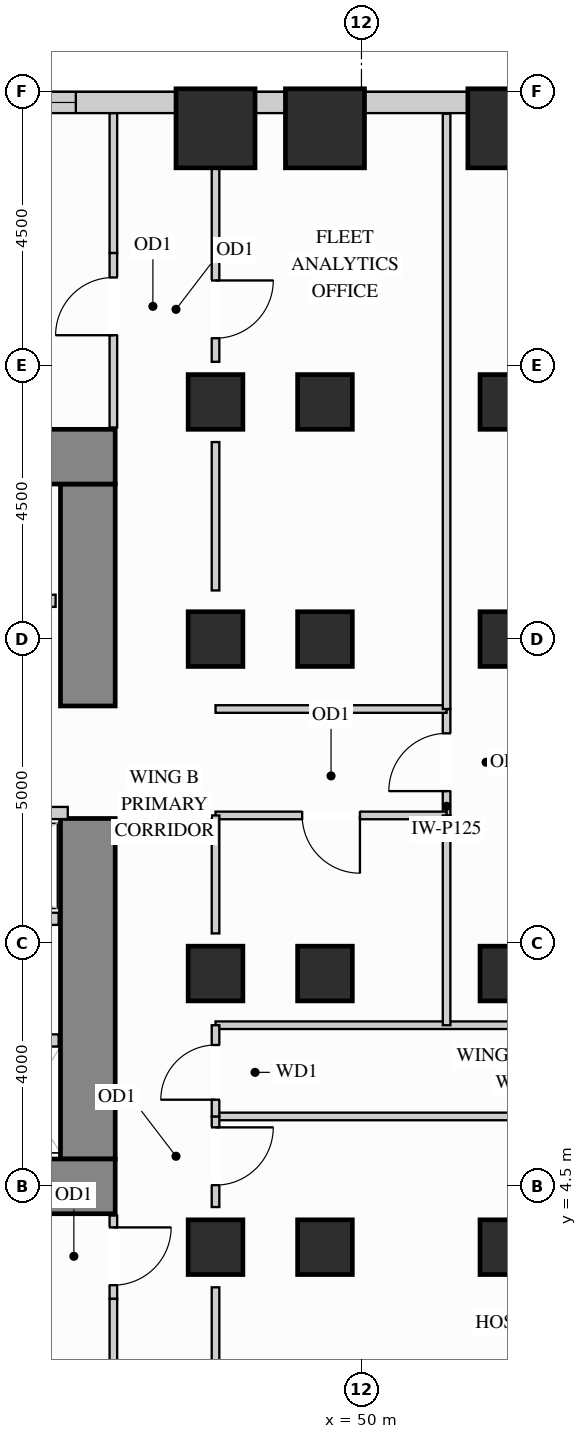
"""IFC4 building model, lengths in metres.
Left out: names, types, materials, properties, quantities, classifications, styles, units other than length and angle.
Written with IfcOpenShell. Run it as: python <this file> out.ifc"""

import sys

from ifc_helpers import new_model, si_unit, direction, frame, frame_2d, origin, origin_2d, place, context, subcontext, project, spatial, rectangle, extrude, source, transform, mapped, element, fill, save


model = new_model("IFC4")
c1 = context("Model", 3, precision=1e-05, world=origin(), true_north=direction((0.0, 1.0)))
c2 = subcontext(c1, "Body", "Model", "MODEL_VIEW")
j1 = project(units=[si_unit("LENGTHUNIT", "METRE"), si_unit("PLANEANGLEUNIT", "RADIAN")], contexts=[c1])
p1 = place(None, origin())
s1 = spatial("IfcSite", under=j1, at=p1, CompositionType="ELEMENT")
p2 = place(p1, origin())
s2 = spatial("IfcBuilding", under=s1, at=p2, CompositionType="ELEMENT")
p3 = place(p2, frame((0.0, 0.0, 62.1)))
s3 = spatial("IfcBuildingStorey", under=s2, at=p3, CompositionType="ELEMENT", Elevation=62.1)
m1 = source(origin(), c2, "Body", "SweptSolid", [
    extrude(rectangle(XDim=0.9, YDim=0.9, at=origin_2d()), origin(), (0.0, 0.0, 1.0), 3.38),
])
for number, where, z_axis, x_axis in (
    (1, (47.6, 13.5, 0.0), (0.0, 0.0, 1.0), (1.0, 0.0, 0.0)),
    (2, (47.6, 3.5, 0.0), (0.0, 0.0, 1.0), (1.0, 0.0, 0.0)),
    (3, (47.6, 8.0, 0.0), (0.0, 0.0, 1.0), (1.0, 0.0, 0.0)),
    (4, (47.6, 17.4, 0.0), (0.0, 0.0, 1.0), (1.0, 0.0, 0.0)),
    (5, (49.4, 13.5, 0.0), (0.0, 0.0, 1.0), (1.0, 0.0, 0.0)),
    (6, (49.4, 17.4, 0.0), (0.0, 0.0, 1.0), (1.0, 0.0, 0.0)),
    (7, (49.4, 3.5, 0.0), (0.0, 0.0, 1.0), (1.0, 0.0, 0.0)),
    (8, (49.4, 8.0, 0.0), (0.0, 0.0, 1.0), (1.0, 0.0, 0.0)),
    (9, (52.4, 13.5, 0.0), (0.0, 0.0, 1.0), (1.0, 0.0, 0.0)),
    (10, (52.4, 17.4, 0.0), (0.0, 0.0, 1.0), (1.0, 0.0, 0.0)),
    (11, (52.4, 3.5, 0.0), (0.0, 0.0, 1.0), (1.0, 0.0, 0.0)),
    (12, (52.4, 8.0, 0.0), (0.0, 0.0, 1.0), (1.0, 0.0, 0.0)),
):
    element("IfcColumn", number, at=place(p3, frame(where, z_axis=z_axis, x_axis=x_axis)), inside=s3, PredefinedType="COLUMN", context=c2, shape_type="MappedRepresentation", body=[
        mapped(m1, transform((0.0, 0.0, 0.0), x_axis=(1.0, 0.0, 0.0), y_axis=(0.0, 1.0, 0.0), z_axis=(0.0, 0.0, 1.0))),
    ])
m2 = source(origin(), c2, "Body", "SweptSolid", [
    extrude(rectangle(XDim=1.3, YDim=1.3, at=origin_2d()), origin(), (0.0, 0.0, 1.0), 3.38),
])
for number, where, z_axis, x_axis in (
    (13, (47.6, 21.9, 0.0), (0.0, 0.0, 1.0), (1.0, 0.0, 0.0)),
    (14, (49.4, 21.9, 0.0), (0.0, 0.0, 1.0), (1.0, 0.0, 0.0)),
    (15, (52.4, 21.9, 0.0), (0.0, 0.0, 1.0), (1.0, 0.0, 0.0)),
):
    element("IfcColumn", number, at=place(p3, frame(where, z_axis=z_axis, x_axis=x_axis)), inside=s3, PredefinedType="COLUMN", context=c2, shape_type="MappedRepresentation", body=[
        mapped(m2, transform((0.0, 0.0, 0.0), x_axis=(1.0, 0.0, 0.0), y_axis=(0.0, 1.0, 0.0), z_axis=(0.0, 0.0, 1.0))),
    ])
m3 = source(origin(), c2, "Body", "SweptSolid", [
    extrude(rectangle(XDim=5.6, YDim=0.9, at=frame_2d((2.8, 0.0))), origin(), (0.0, 0.0, 1.0), 3.38),
])
p4 = place(p3, frame((45.5, 4.95, 0.0), z_axis=(0.0, 0.0, 1.0), x_axis=(0.0, 1.0, 0.0)))
e16 = element("IfcWall", 16, at=p4, inside=s3, PredefinedType="SHEAR", context=c2, shape_type="MappedRepresentation", body=[
    mapped(m3, transform((0.0, 0.0, 0.0), x_axis=(1.0, 0.0, 0.0), y_axis=(0.0, 1.0, 0.0), z_axis=(0.0, 0.0, 1.0))),
])
m4 = source(origin(), c2, "Body", "SweptSolid", [
    extrude(rectangle(XDim=3.65, YDim=0.9, at=frame_2d((1.825, 0.0))), origin(), (0.0, 0.0, 1.0), 3.38),
])
p5 = place(p3, frame((45.5, 12.4, 0.0), z_axis=(0.0, 0.0, 1.0), x_axis=(0.0, 1.0, 0.0)))
e17 = element("IfcWall", 17, at=p5, inside=s3, PredefinedType="SHEAR", context=c2, shape_type="MappedRepresentation", body=[
    mapped(m4, transform((0.0, 0.0, 0.0), x_axis=(1.0, 0.0, 0.0), y_axis=(0.0, 1.0, 0.0), z_axis=(0.0, 0.0, 1.0))),
])
m5 = source(origin(), c2, "Body", "SweptSolid", [
    extrude(rectangle(XDim=10.4, YDim=0.9, at=frame_2d((5.2, 0.0))), origin(), (0.0, 0.0, 1.0), 3.38),
])
for number, where, z_axis, x_axis in (
    (18, (35.55, 16.5, 0.0), (0.0, 0.0, 1.0), (1.0, 0.0, 0.0)),
    (19, (35.55, 4.5, 0.0), (0.0, 0.0, 1.0), (1.0, 0.0, 0.0)),
):
    element("IfcWall", number, at=place(p3, frame(where, z_axis=z_axis, x_axis=x_axis)), inside=s3, PredefinedType="SHEAR", context=c2, shape_type="MappedRepresentation", body=[
        mapped(m5, transform((0.0, 0.0, 0.0), x_axis=(1.0, 0.0, 0.0), y_axis=(0.0, 1.0, 0.0), z_axis=(0.0, 0.0, 1.0))),
    ])
m6 = source(origin(), c2, "Body", "SweptSolid", [
    extrude(rectangle(XDim=1.704, YDim=0.35, at=frame_2d((0.852, 0.0))), origin(), (0.0, 0.0, 1.0), 2.51),
])
p6 = place(p3, frame((51.752, 22.325, 0.0), z_axis=(0.0, 0.0, 1.0), x_axis=(-1.0, 0.0, 0.0)))
e20 = element("IfcWall", 20, at=p6, inside=s3, PredefinedType="SOLIDWALL", context=c2, shape_type="MappedRepresentation", body=[
    mapped(m6, transform((0.0, 0.0, 0.0), x_axis=(1.0, 0.0, 0.0), y_axis=(0.0, 1.0, 0.0), z_axis=(0.0, 0.0, 1.0))),
])
m7 = source(origin(), c2, "Body", "SweptSolid", [
    extrude(rectangle(XDim=0.504, YDim=0.35, at=frame_2d((0.252, 0.0))), origin(), (0.0, 0.0, 1.0), 3.365),
])
p7 = place(p3, frame((48.752, 22.325, 0.0), z_axis=(0.0, 0.0, 1.0), x_axis=(-1.0, 0.0, 0.0)))
e21 = element("IfcWall", 21, at=p7, inside=s3, PredefinedType="SOLIDWALL", context=c2, shape_type="MappedRepresentation", body=[
    mapped(m7, transform((0.0, 0.0, 0.0), x_axis=(1.0, 0.0, 0.0), y_axis=(0.0, 1.0, 0.0), z_axis=(0.0, 0.0, 1.0))),
])
p8 = place(p3, frame((46.952, 22.325, 0.0), z_axis=(0.0, 0.0, 1.0), x_axis=(-1.0, 0.0, 0.0)))
e22 = element("IfcWall", 22, at=p8, inside=s3, PredefinedType="SOLIDWALL", context=c2, shape_type="SweptSolid", body=[
    extrude(rectangle(XDim=6.304, YDim=0.35, at=frame_2d((3.152, 0.0))), origin(), (0.0, 0.0, 1.0), 2.51),
])
p9 = place(p8, frame((1.649, 0.0, 0.78)))
e23 = element("IfcOpeningElement", 23, at=p9, cuts=e22, PredefinedType="OPENING", context=c2, shape_type="SweptSolid", body=[
    extrude(rectangle(XDim=1.8, YDim=1.55, at=frame_2d((0.9, 0.775))), frame((0.0, 0.185, 0.0), z_axis=(0.0, -1.0, 0.0), x_axis=(1.0, 0.0, 0.0)), (0.0, 0.0, 1.0), 0.37),
])
p10 = place(p8, frame((3.817, 0.0, 0.78)))
e24 = element("IfcOpeningElement", 24, at=p10, cuts=e22, PredefinedType="OPENING", context=c2, shape_type="SweptSolid", body=[
    extrude(rectangle(XDim=1.8, YDim=1.55, at=frame_2d((0.9, 0.775))), frame((0.0, 0.185, 0.0), z_axis=(0.0, -1.0, 0.0), x_axis=(1.0, 0.0, 0.0)), (0.0, 0.0, 1.0), 0.37),
])
p11 = place(p3, frame((51.4, 10.6, 0.0), z_axis=(0.0, 0.0, 1.0), x_axis=(0.0, 1.0, 0.0)))
e25 = element("IfcWall", 25, at=p11, inside=s3, PredefinedType="PARTITIONING", context=c2, shape_type="SweptSolid", body=[
    extrude(rectangle(XDim=1.75, YDim=0.125, at=frame_2d((0.875, 0.0))), origin(), (0.0, 0.0, 1.0), 3.365),
])
p12 = place(p11, frame((0.4, 0.0, 0.0)))
e26 = element("IfcOpeningElement", 26, at=p12, cuts=e25, PredefinedType="OPENING", context=c2, shape_type="SweptSolid", body=[
    extrude(rectangle(XDim=0.95, YDim=2.15, at=frame_2d((0.475, 1.075))), frame((0.0, 0.073, 0.0), z_axis=(0.0, -1.0, 0.0), x_axis=(1.0, 0.0, 0.0)), (0.0, 0.0, 1.0), 0.145),
])
m8 = source(origin(), c2, "Body", "SweptSolid", [
    extrude(rectangle(XDim=11.048, YDim=0.125, at=frame_2d((5.524, 0.0))), origin(), (0.0, 0.0, 1.0), 3.365),
])
for number, where, z_axis, x_axis in (
    (27, (47.6, 5.65, 0.0), (0.0, 0.0, 1.0), (1.0, 0.0, 0.0)),
    (28, (47.6, 7.15, 0.0), (0.0, 0.0, 1.0), (1.0, 0.0, 0.0)),
):
    element("IfcWall", number, at=place(p3, frame(where, z_axis=z_axis, x_axis=x_axis)), inside=s3, PredefinedType="PARTITIONING", context=c2, shape_type="MappedRepresentation", body=[
        mapped(m8, transform((0.0, 0.0, 0.0), x_axis=(1.0, 0.0, 0.0), y_axis=(0.0, 1.0, 0.0), z_axis=(0.0, 0.0, 1.0))),
    ])
m9 = source(origin(), c2, "Body", "SweptSolid", [
    extrude(rectangle(XDim=3.8, YDim=0.125, at=frame_2d((1.9, 0.0))), origin(), (0.0, 0.0, 1.0), 3.365),
])
p13 = place(p3, frame((47.6, 12.35, 0.0), z_axis=(0.0, 0.0, 1.0), x_axis=(1.0, 0.0, 0.0)))
e29 = element("IfcWall", 29, at=p13, inside=s3, PredefinedType="PARTITIONING", context=c2, shape_type="MappedRepresentation", body=[
    mapped(m9, transform((0.0, 0.0, 0.0), x_axis=(1.0, 0.0, 0.0), y_axis=(0.0, 1.0, 0.0), z_axis=(0.0, 0.0, 1.0))),
])
p14 = place(p3, frame((47.6, 10.6, 0.0), z_axis=(0.0, 0.0, 1.0), x_axis=(1.0, 0.0, 0.0)))
e30 = element("IfcWall", 30, at=p14, inside=s3, PredefinedType="PARTITIONING", context=c2, shape_type="SweptSolid", body=[
    extrude(rectangle(XDim=3.8, YDim=0.125, at=frame_2d((1.9, 0.0))), origin(), (0.0, 0.0, 1.0), 2.67),
])
p15 = place(p14, frame((1.425, 0.0, 0.0)))
e31 = element("IfcOpeningElement", 31, at=p15, cuts=e30, PredefinedType="OPENING", context=c2, shape_type="SweptSolid", body=[
    extrude(rectangle(XDim=0.95, YDim=2.15, at=frame_2d((0.475, 1.075))), frame((0.0, 0.073, 0.0), z_axis=(0.0, -1.0, 0.0), x_axis=(1.0, 0.0, 0.0)), (0.0, 0.0, 1.0), 0.145),
])
m10 = source(origin(), c2, "Body", "SweptSolid", [
    extrude(rectangle(XDim=3.45, YDim=0.125, at=frame_2d((1.725, 0.0))), origin(), (0.0, 0.0, 1.0), 3.365),
])
p16 = place(p3, frame((51.4, 7.15, 0.0), z_axis=(0.0, 0.0, 1.0), x_axis=(0.0, 1.0, 0.0)))
e32 = element("IfcWall", 32, at=p16, inside=s3, PredefinedType="PARTITIONING", context=c2, shape_type="MappedRepresentation", body=[
    mapped(m10, transform((0.0, 0.0, 0.0), x_axis=(1.0, 0.0, 0.0), y_axis=(0.0, 1.0, 0.0), z_axis=(0.0, 0.0, 1.0))),
])
m11 = source(origin(), c2, "Body", "SweptSolid", [
    extrude(rectangle(XDim=9.79, YDim=0.125, at=frame_2d((4.895, 0.0))), origin(), (0.0, 0.0, 1.0), 3.365),
])
p17 = place(p3, frame((51.4, 12.35, 0.0), z_axis=(0.0, 0.0, 1.0), x_axis=(0.0, 1.0, 0.0)))
e33 = element("IfcWall", 33, at=p17, inside=s3, PredefinedType="PARTITIONING", context=c2, shape_type="MappedRepresentation", body=[
    mapped(m11, transform((0.0, 0.0, 0.0), x_axis=(1.0, 0.0, 0.0), y_axis=(0.0, 1.0, 0.0), z_axis=(0.0, 0.0, 1.0))),
])
p18 = place(p3, frame((47.6, 4.16, 0.0), z_axis=(0.0, 0.0, 1.0), x_axis=(0.0, 1.0, 0.0)))
e34 = element("IfcWall", 34, at=p18, inside=s3, PredefinedType="PARTITIONING", context=c2, shape_type="SweptSolid", body=[
    extrude(rectangle(XDim=1.49, YDim=0.125, at=frame_2d((0.745, 0.0))), origin(), (0.0, 0.0, 1.0), 2.67),
])
p19 = place(p18, frame((0.36, 0.0, 0.0)))
e35 = element("IfcOpeningElement", 35, at=p19, cuts=e34, PredefinedType="OPENING", context=c2, shape_type="SweptSolid", body=[
    extrude(rectangle(XDim=0.95, YDim=2.15, at=frame_2d((0.475, 1.075))), frame((0.0, 0.073, 0.0), z_axis=(0.0, -1.0, 0.0), x_axis=(1.0, 0.0, 0.0)), (0.0, 0.0, 1.0), 0.145),
])
m12 = source(origin(), c2, "Body", "SweptSolid", [
    extrude(rectangle(XDim=1.58, YDim=0.125, at=frame_2d((0.79, 0.0))), origin(), (0.0, 0.0, 1.0), 2.67),
])
p20 = place(p3, frame((47.6, 1.26, 0.0), z_axis=(0.0, 0.0, 1.0), x_axis=(0.0, 1.0, 0.0)))
e36 = element("IfcWall", 36, at=p20, inside=s3, PredefinedType="PARTITIONING", context=c2, shape_type="MappedRepresentation", body=[
    mapped(m12, transform((0.0, 0.0, 0.0), x_axis=(1.0, 0.0, 0.0), y_axis=(0.0, 1.0, 0.0), z_axis=(0.0, 0.0, 1.0))),
])
m13 = source(origin(), c2, "Body", "SweptSolid", [
    extrude(rectangle(XDim=1.94, YDim=0.125, at=frame_2d((0.97, 0.0))), origin(), (0.0, 0.0, 1.0), 2.67),
])
p21 = place(p3, frame((47.6, 8.66, 0.0), z_axis=(0.0, 0.0, 1.0), x_axis=(0.0, 1.0, 0.0)))
e37 = element("IfcWall", 37, at=p21, inside=s3, PredefinedType="PARTITIONING", context=c2, shape_type="MappedRepresentation", body=[
    mapped(m13, transform((0.0, 0.0, 0.0), x_axis=(1.0, 0.0, 0.0), y_axis=(0.0, 1.0, 0.0), z_axis=(0.0, 0.0, 1.0))),
])
m14 = source(origin(), c2, "Body", "SweptSolid", [
    extrude(rectangle(XDim=2.44, YDim=0.125, at=frame_2d((1.22, 0.0))), origin(), (0.0, 0.0, 1.0), 2.67),
])
p22 = place(p3, frame((47.6, 14.3, 0.0), z_axis=(0.0, 0.0, 1.0), x_axis=(0.0, 1.0, 0.0)))
e38 = element("IfcWall", 38, at=p22, inside=s3, PredefinedType="PARTITIONING", context=c2, shape_type="MappedRepresentation", body=[
    mapped(m14, transform((0.0, 0.0, 0.0), x_axis=(1.0, 0.0, 0.0), y_axis=(0.0, 1.0, 0.0), z_axis=(0.0, 0.0, 1.0))),
])
p23 = place(p3, frame((47.6, 18.06, 0.0), z_axis=(0.0, 0.0, 1.0), x_axis=(0.0, 1.0, 0.0)))
e39 = element("IfcWall", 39, at=p23, inside=s3, PredefinedType="PARTITIONING", context=c2, shape_type="SweptSolid", body=[
    extrude(rectangle(XDim=3.18, YDim=0.125, at=frame_2d((1.59, 0.0))), origin(), (0.0, 0.0, 1.0), 2.67),
])
p24 = place(p23, frame((0.388, 0.0, 0.0)))
e40 = element("IfcOpeningElement", 40, at=p24, cuts=e39, PredefinedType="OPENING", context=c2, shape_type="SweptSolid", body=[
    extrude(rectangle(XDim=0.95, YDim=2.15, at=frame_2d((0.475, 1.075))), frame((0.0, 0.073, 0.0), z_axis=(0.0, -1.0, 0.0), x_axis=(1.0, 0.0, 0.0)), (0.0, 0.0, 1.0), 0.145),
])
p25 = place(p3, frame((47.6, 5.65, 0.0), z_axis=(0.0, 0.0, 1.0), x_axis=(0.0, 1.0, 0.0)))
e41 = element("IfcWall", 41, at=p25, inside=s3, PredefinedType="PARTITIONING", context=c2, shape_type="SweptSolid", body=[
    extrude(rectangle(XDim=1.5, YDim=0.125, at=frame_2d((0.75, 0.0))), origin(), (0.0, 0.0, 1.0), 2.67),
])
p26 = place(p25, frame((0.275, 0.0, 0.0)))
e42 = element("IfcOpeningElement", 42, at=p26, cuts=e41, PredefinedType="OPENING", context=c2, shape_type="SweptSolid", body=[
    extrude(rectangle(XDim=0.9, YDim=2.15, at=frame_2d((0.45, 1.075))), frame((0.0, 0.073, 0.0), z_axis=(0.0, -1.0, 0.0), x_axis=(1.0, 0.0, 0.0)), (0.0, 0.0, 1.0), 0.145),
])
p27 = place(p3, frame((45.92, 16.98, 0.0), z_axis=(0.0, 0.0, 1.0), x_axis=(0.0, 1.0, 0.0)))
e43 = element("IfcWall", 43, at=p27, inside=s3, PredefinedType="PARTITIONING", context=c2, shape_type="SweptSolid", body=[
    extrude(rectangle(XDim=2.87, YDim=0.125, at=frame_2d((1.435, 0.0))), origin(), (0.0, 0.0, 1.0), 3.365),
])
p28 = place(p27, frame((1.517, 0.0, 0.0)))
e44 = element("IfcOpeningElement", 44, at=p28, cuts=e43, PredefinedType="OPENING", context=c2, shape_type="SweptSolid", body=[
    extrude(rectangle(XDim=0.95, YDim=2.15, at=frame_2d((0.475, 1.075))), frame((0.0, 0.073, 0.0), z_axis=(0.0, -1.0, 0.0), x_axis=(1.0, 0.0, 0.0)), (0.0, 0.0, 1.0), 0.145),
])
m15 = source(origin(), c2, "Body", "SweptSolid", [
    extrude(rectangle(XDim=2.298, YDim=0.125, at=frame_2d((1.149, 0.0))), origin(), (0.0, 0.0, 1.0), 3.365),
])
p29 = place(p3, frame((45.92, 19.85, 0.0), z_axis=(0.0, 0.0, 1.0), x_axis=(0.0, 1.0, 0.0)))
e45 = element("IfcWall", 45, at=p29, inside=s3, PredefinedType="PARTITIONING", context=c2, shape_type="MappedRepresentation", body=[
    mapped(m15, transform((0.0, 0.0, 0.0), x_axis=(1.0, 0.0, 0.0), y_axis=(0.0, 1.0, 0.0), z_axis=(0.0, 0.0, 1.0))),
])
p30 = place(p3, frame((45.92, 2.65, 0.0), z_axis=(0.0, 0.0, 1.0), x_axis=(0.0, 1.0, 0.0)))
e46 = element("IfcWall", 46, at=p30, inside=s3, PredefinedType="PARTITIONING", context=c2, shape_type="SweptSolid", body=[
    extrude(rectangle(XDim=1.37, YDim=0.125, at=frame_2d((0.685, 0.0))), origin(), (0.0, 0.0, 1.0), 3.365),
])
p31 = place(p30, frame((0.225, 0.0, 0.0)))
e47 = element("IfcOpeningElement", 47, at=p31, cuts=e46, PredefinedType="OPENING", context=c2, shape_type="SweptSolid", body=[
    extrude(rectangle(XDim=0.95, YDim=2.15, at=frame_2d((0.475, 1.075))), frame((0.0, 0.073, 0.0), z_axis=(0.0, -1.0, 0.0), x_axis=(1.0, 0.0, 0.0)), (0.0, 0.0, 1.0), 0.145),
])
p32 = place(p3, frame((45.92, 0.352, 0.0), z_axis=(0.0, 0.0, 1.0), x_axis=(0.0, 1.0, 0.0)))
e48 = element("IfcWall", 48, at=p32, inside=s3, PredefinedType="PARTITIONING", context=c2, shape_type="MappedRepresentation", body=[
    mapped(m15, transform((0.0, 0.0, 0.0), x_axis=(1.0, 0.0, 0.0), y_axis=(0.0, 1.0, 0.0), z_axis=(0.0, 0.0, 1.0))),
])
m16 = source(origin(), c2, "Body", "SweptSolid", [
    extrude(rectangle(XDim=1.17, YDim=0.2, at=frame_2d((0.585, 0.0))), origin(), (0.0, 0.0, 1.0), 3.365),
])
p33 = place(p3, frame((43.85, 6.9, 0.0), z_axis=(0.0, 0.0, 1.0), x_axis=(1.0, 0.0, 0.0)))
e49 = element("IfcWall", 49, at=p33, inside=s3, PredefinedType="PARTITIONING", context=c2, shape_type="MappedRepresentation", body=[
    mapped(m16, transform((0.0, 0.0, 0.0), x_axis=(1.0, 0.0, 0.0), y_axis=(0.0, 1.0, 0.0), z_axis=(0.0, 0.0, 1.0))),
])
p34 = place(p3, frame((42.23, 14.13, 0.0), z_axis=(0.0, 0.0, 1.0), x_axis=(1.0, 0.0, 0.0)))
e50 = element("IfcWall", 50, at=p34, inside=s3, PredefinedType="PARTITIONING", context=c2, shape_type="SweptSolid", body=[
    extrude(rectangle(XDim=2.74, YDim=0.2, at=frame_2d((1.37, 0.0))), origin(), (0.0, 0.0, 1.0), 3.365),
])
p35 = place(p34, frame((0.82, 0.0, 0.0)))
e51 = element("IfcOpeningElement", 51, at=p35, cuts=e50, PredefinedType="OPENING", context=c2, shape_type="SweptSolid", body=[
    extrude(rectangle(XDim=1.1, YDim=2.2, at=frame_2d((0.55, 1.1))), frame((0.0, 0.11, 0.0), z_axis=(0.0, -1.0, 0.0), x_axis=(1.0, 0.0, 0.0)), (0.0, 0.0, 1.0), 0.22),
])
m17 = source(origin(), c2, "Body", "SweptSolid", [
    extrude(rectangle(XDim=3.49, YDim=0.2, at=frame_2d((1.745, 0.0))), origin(), (0.0, 0.0, 1.0), 3.365),
])
p36 = place(p3, frame((41.68, 10.64, 0.0), z_axis=(0.0, 0.0, 1.0), x_axis=(1.0, 0.0, 0.0)))
e52 = element("IfcWall", 52, at=p36, inside=s3, PredefinedType="PARTITIONING", context=c2, shape_type="MappedRepresentation", body=[
    mapped(m17, transform((0.0, 0.0, 0.0), x_axis=(1.0, 0.0, 0.0), y_axis=(0.0, 1.0, 0.0), z_axis=(0.0, 0.0, 1.0))),
])
m18 = source(origin(), c2, "Body", "SweptSolid", [
    extrude(rectangle(XDim=3.34, YDim=0.2, at=frame_2d((1.67, 0.0))), origin(), (0.0, 0.0, 1.0), 3.365),
])
p37 = place(p3, frame((41.68, 8.9, 0.0), z_axis=(0.0, 0.0, 1.0), x_axis=(1.0, 0.0, 0.0)))
e53 = element("IfcWall", 53, at=p37, inside=s3, PredefinedType="PARTITIONING", context=c2, shape_type="MappedRepresentation", body=[
    mapped(m18, transform((0.0, 0.0, 0.0), x_axis=(1.0, 0.0, 0.0), y_axis=(0.0, 1.0, 0.0), z_axis=(0.0, 0.0, 1.0))),
])
m19 = source(origin(), c2, "Body", "SweptSolid", [
    extrude(rectangle(XDim=0.95, YDim=2.15, at=frame_2d((0.475, 1.075))), frame((0.0, 0.025, 0.0), z_axis=(0.0, -1.0, 0.0), x_axis=(1.0, 0.0, 0.0)), (0.0, 0.0, 1.0), 0.05),
])
p38 = place(p28, origin())
e54 = element("IfcDoor", 54, at=p38, inside=s3, OperationType="SINGLE_SWING_LEFT", PredefinedType="DOOR", context=c2, shape_type="MappedRepresentation", body=[
    mapped(m19, transform((0.0, 0.0, 0.0), x_axis=(1.0, 0.0, 0.0), y_axis=(0.0, 1.0, 0.0), z_axis=(0.0, 0.0, 1.0))),
])
fill(e44, e54)
p39 = place(p31, origin())
e55 = element("IfcDoor", 55, at=p39, inside=s3, OperationType="SINGLE_SWING_RIGHT", PredefinedType="DOOR", context=c2, shape_type="MappedRepresentation", body=[
    mapped(m19, transform((0.0, 0.0, 0.0), x_axis=(1.0, 0.0, 0.0), y_axis=(0.0, 1.0, 0.0), z_axis=(0.0, 0.0, 1.0))),
])
fill(e47, e55)
p40 = place(p19, origin())
e56 = element("IfcDoor", 56, at=p40, inside=s3, OperationType="SINGLE_SWING_RIGHT", PredefinedType="DOOR", context=c2, shape_type="MappedRepresentation", body=[
    mapped(m19, transform((0.0, 0.0, 0.0), x_axis=(1.0, 0.0, 0.0), y_axis=(0.0, 1.0, 0.0), z_axis=(0.0, 0.0, 1.0))),
])
fill(e35, e56)
p41 = place(p15, origin())
e57 = element("IfcDoor", 57, at=p41, inside=s3, OperationType="SINGLE_SWING_RIGHT", PredefinedType="DOOR", context=c2, shape_type="MappedRepresentation", body=[
    mapped(m19, transform((0.0, 0.0, 0.0), x_axis=(1.0, 0.0, 0.0), y_axis=(0.0, 1.0, 0.0), z_axis=(0.0, 0.0, 1.0))),
])
fill(e31, e57)
p42 = place(p12, origin())
e58 = element("IfcDoor", 58, at=p42, inside=s3, OperationType="SINGLE_SWING_LEFT", PredefinedType="DOOR", context=c2, shape_type="MappedRepresentation", body=[
    mapped(m19, transform((0.0, 0.0, 0.0), x_axis=(1.0, 0.0, 0.0), y_axis=(0.0, 1.0, 0.0), z_axis=(0.0, 0.0, 1.0))),
])
fill(e26, e58)
p43 = place(p24, origin())
e59 = element("IfcDoor", 59, at=p43, inside=s3, OperationType="SINGLE_SWING_RIGHT", PredefinedType="DOOR", context=c2, shape_type="MappedRepresentation", body=[
    mapped(m19, transform((0.0, 0.0, 0.0), x_axis=(1.0, 0.0, 0.0), y_axis=(0.0, 1.0, 0.0), z_axis=(0.0, 0.0, 1.0))),
])
fill(e40, e59)
m20 = source(origin(), c2, "Body", "SweptSolid", [
    extrude(rectangle(XDim=0.9, YDim=2.15, at=frame_2d((0.45, 1.075))), frame((0.0, 0.025, 0.0), z_axis=(0.0, -1.0, 0.0), x_axis=(1.0, 0.0, 0.0)), (0.0, 0.0, 1.0), 0.05),
])
p44 = place(p26, origin())
e60 = element("IfcDoor", 60, at=p44, inside=s3, OperationType="SINGLE_SWING_LEFT", PredefinedType="DOOR", context=c2, shape_type="MappedRepresentation", body=[
    mapped(m20, transform((0.0, 0.0, 0.0), x_axis=(1.0, 0.0, 0.0), y_axis=(0.0, 1.0, 0.0), z_axis=(0.0, 0.0, 1.0))),
])
fill(e42, e60)
m21 = source(origin(), c2, "Body", "SweptSolid", [
    extrude(rectangle(XDim=1.8, YDim=1.55, at=frame_2d((0.9, 0.775))), frame((0.0, 0.03, 0.0), z_axis=(0.0, -1.0, 0.0), x_axis=(1.0, 0.0, 0.0)), (0.0, 0.0, 1.0), 0.06),
])
p45 = place(p9, origin())
e61 = element("IfcWindow", 61, at=p45, inside=s3, PartitioningType="SINGLE_PANEL", PredefinedType="WINDOW", context=c2, shape_type="MappedRepresentation", body=[
    mapped(m21, transform((0.0, 0.0, 0.0), x_axis=(1.0, 0.0, 0.0), y_axis=(0.0, 1.0, 0.0), z_axis=(0.0, 0.0, 1.0))),
])
fill(e23, e61)
save(model, sys.argv[1])
